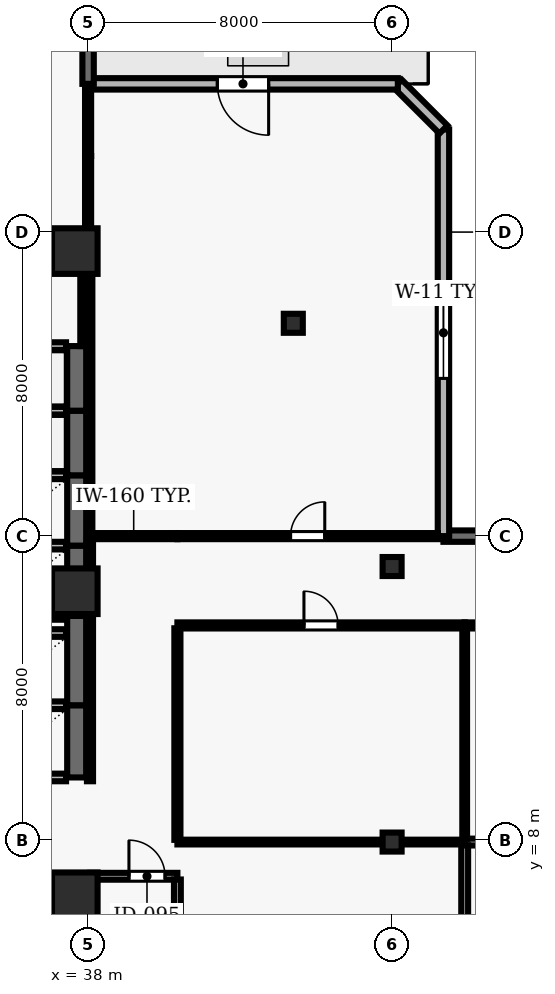
"""IFC4 building model, lengths in metres.
Left out: names, types, materials, properties, quantities, classifications, styles, units other than length and angle.
Written with IfcOpenShell. Run it as: python <this file> out.ifc"""

import sys

from ifc_helpers import new_model, si_unit, direction, frame, frame_2d, origin, origin_2d, place, context, subcontext, project, spatial, rectangle, hollow_rectangle, extrude, element, fill, save


model = new_model("IFC4")
c1 = context("Model", 3, precision=1e-05, world=origin(), true_north=direction((0.0, 1.0)))
c2 = subcontext(c1, "Body", "Model", "MODEL_VIEW")
j1 = project(units=[si_unit("LENGTHUNIT", "METRE"), si_unit("PLANEANGLEUNIT", "RADIAN")], contexts=[c1])
p1 = place(None, origin())
s1 = spatial("IfcSite", under=j1, at=p1, CompositionType="ELEMENT")
p2 = place(p1, origin())
s2 = spatial("IfcBuilding", under=s1, at=p2, CompositionType="ELEMENT")
p3 = place(p2, frame((0.0, 0.0, 122.9)))
s3 = spatial("IfcBuildingStorey", under=s2, at=p3, CompositionType="ELEMENT", Elevation=122.9)
for number, where, z_axis, x_axis in (
    (1, (37.65, 6.55, 0.0), (0.0, 0.0, 1.0), (1.0, 0.0, 0.0)),
    (2, (37.65, 14.55, 0.0), (0.0, 0.0, 1.0), (1.0, 0.0, 0.0)),
    (3, (37.65, 23.5, 0.0), (0.0, 0.0, 1.0), (1.0, 0.0, 0.0)),
):
    element("IfcColumn", number, at=place(p3, frame(where, z_axis=z_axis, x_axis=x_axis)), inside=s3, PredefinedType="COLUMN", context=c2, shape_type="SweptSolid", body=[
        extrude(rectangle(XDim=1.2, YDim=1.2, at=origin_2d()), origin(), (0.0, 0.0, 1.0), 3.9),
    ])
for number, where, z_axis, x_axis in (
    (4, (46.0, 7.95, 0.0), (0.0, 0.0, 1.0), (1.0, 0.0, 0.0)),
    (5, (46.0, 15.2, 0.0), (0.0, 0.0, 1.0), (1.0, 0.0, 0.0)),
    (6, (43.4, 21.6, 0.0), (0.0, 0.0, 1.0), (1.0, 0.0, 0.0)),
):
    element("IfcColumn", number, at=place(p3, frame(where, z_axis=z_axis, x_axis=x_axis)), inside=s3, PredefinedType="COLUMN", context=c2, shape_type="SweptSolid", body=[
        extrude(hollow_rectangle(XDim=0.5, YDim=0.5, WallThickness=0.025, at=origin_2d()), origin(), (0.0, 0.0, 1.0), 3.9),
    ])
p4 = place(p3, frame((68.1, 16.0, 0.0), z_axis=(0.0, 0.0, 1.0), x_axis=(-1.0, 0.0, 0.0)))
e7 = element("IfcWall", 7, at=p4, inside=s3, PredefinedType="SOLIDWALL", context=c2, shape_type="SweptSolid", body=[
    extrude(rectangle(XDim=20.749, YDim=0.3, at=frame_2d((10.375, 0.0))), origin(), (0.0, 0.0, 1.0), 3.69),
])
p5 = place(p4, frame((7.248, 0.0, 0.0)))
e8 = element("IfcOpeningElement", 8, at=p5, cuts=e7, PredefinedType="OPENING", context=c2, shape_type="SweptSolid", body=[
    extrude(rectangle(XDim=1.0, YDim=2.2, at=frame_2d((0.5, 1.1))), frame((0.0, 0.16, 0.0), z_axis=(0.0, -1.0, 0.0), x_axis=(1.0, 0.0, 0.0)), (0.0, 0.0, 1.0), 0.32),
])
p6 = place(p4, frame((2.558, 0.0, 0.9)))
e9 = element("IfcOpeningElement", 9, at=p6, cuts=e7, PredefinedType="OPENING", context=c2, shape_type="SweptSolid", body=[
    extrude(rectangle(XDim=1.8, YDim=2.2, at=frame_2d((0.9, 1.1))), frame((0.0, 0.16, 0.0), z_axis=(0.0, -1.0, 0.0), x_axis=(1.0, 0.0, 0.0)), (0.0, 0.0, 1.0), 0.32),
])
p7 = place(p4, frame((9.474, 0.0, 0.9)))
e10 = element("IfcOpeningElement", 10, at=p7, cuts=e7, PredefinedType="OPENING", context=c2, shape_type="SweptSolid", body=[
    extrude(rectangle(XDim=1.8, YDim=2.2, at=frame_2d((0.9, 1.1))), frame((0.0, 0.16, 0.0), z_axis=(0.0, -1.0, 0.0), x_axis=(1.0, 0.0, 0.0)), (0.0, 0.0, 1.0), 0.32),
])
p8 = place(p4, frame((16.391, 0.0, 0.9)))
e11 = element("IfcOpeningElement", 11, at=p8, cuts=e7, PredefinedType="OPENING", context=c2, shape_type="SweptSolid", body=[
    extrude(rectangle(XDim=1.8, YDim=2.2, at=frame_2d((0.9, 1.1))), frame((0.0, 0.16, 0.0), z_axis=(0.0, -1.0, 0.0), x_axis=(1.0, 0.0, 0.0)), (0.0, 0.0, 1.0), 0.32),
])
p9 = place(p3, frame((47.351, 16.0, 0.0), z_axis=(0.0, 0.0, 1.0), x_axis=(0.0, 1.0, 0.0)))
e12 = element("IfcWall", 12, at=p9, inside=s3, PredefinedType="SOLIDWALL", context=c2, shape_type="SweptSolid", body=[
    extrude(rectangle(XDim=10.7, YDim=0.3, at=frame_2d((5.35, 0.0))), origin(), (0.0, 0.0, 1.0), 3.69),
])
p10 = place(p9, frame((4.15, 0.0, 0.9)))
e13 = element("IfcOpeningElement", 13, at=p10, cuts=e12, PredefinedType="OPENING", context=c2, shape_type="SweptSolid", body=[
    extrude(rectangle(XDim=2.4, YDim=2.2, at=frame_2d((1.2, 1.1))), frame((0.0, 0.16, 0.0), z_axis=(0.0, -1.0, 0.0), x_axis=(1.0, 0.0, 0.0)), (0.0, 0.0, 1.0), 0.32),
])
p11 = place(p3, frame((47.351, 26.7, 0.0), z_axis=(0.0, 0.0, 1.0), x_axis=(-0.707178703759, 0.707034851297, 0.0)))
e14 = element("IfcWall", 14, at=p11, inside=s3, PredefinedType="SOLIDWALL", context=c2, shape_type="SweptSolid", body=[
    extrude(rectangle(XDim=1.697, YDim=0.3, at=frame_2d((0.849, 0.0))), origin(), (0.0, 0.0, 1.0), 3.69),
])
p12 = place(p3, frame((46.151, 27.9, 0.0), z_axis=(0.0, 0.0, 1.0), x_axis=(-1.0, 0.0, 0.0)))
e15 = element("IfcWall", 15, at=p12, inside=s3, PredefinedType="SOLIDWALL", context=c2, shape_type="SweptSolid", body=[
    extrude(rectangle(XDim=8.151, YDim=0.3, at=frame_2d((4.075, 0.0))), origin(), (0.0, 0.0, 1.0), 3.69),
])
p13 = place(p12, frame((3.4, 0.0, 0.0)))
e16 = element("IfcOpeningElement", 16, at=p13, cuts=e15, PredefinedType="OPENING", context=c2, shape_type="SweptSolid", body=[
    extrude(rectangle(XDim=1.35, YDim=2.2, at=frame_2d((0.675, 1.1))), frame((0.0, 0.16, 0.0), z_axis=(0.0, -1.0, 0.0), x_axis=(1.0, 0.0, 0.0)), (0.0, 0.0, 1.0), 0.32),
])
p14 = place(p3, frame((38.0, 27.9, 0.0), z_axis=(0.0, 0.0, 1.0), x_axis=(0.0, 1.0, 0.0)))
e17 = element("IfcWall", 17, at=p14, inside=s3, PredefinedType="SOLIDWALL", context=c2, shape_type="SweptSolid", body=[
    extrude(rectangle(XDim=18.2, YDim=0.3, at=frame_2d((9.1, 0.0))), origin(), (0.0, 0.0, 1.0), 3.69),
])
p15 = place(p14, frame((9.425, 0.0, 0.0)))
e18 = element("IfcOpeningElement", 18, at=p15, cuts=e17, PredefinedType="OPENING", context=c2, shape_type="SweptSolid", body=[
    extrude(rectangle(XDim=1.0, YDim=2.2, at=frame_2d((0.5, 1.1))), frame((0.0, 0.16, 0.0), z_axis=(0.0, -1.0, 0.0), x_axis=(1.0, 0.0, 0.0)), (0.0, 0.0, 1.0), 0.32),
])
p16 = place(p14, frame((2.733, 0.0, 0.9)))
e19 = element("IfcOpeningElement", 19, at=p16, cuts=e17, PredefinedType="OPENING", context=c2, shape_type="SweptSolid", body=[
    extrude(rectangle(XDim=1.5, YDim=1.6, at=frame_2d((0.75, 0.8))), frame((0.0, 0.16, 0.0), z_axis=(0.0, -1.0, 0.0), x_axis=(1.0, 0.0, 0.0)), (0.0, 0.0, 1.0), 0.32),
])
p17 = place(p14, frame((14.417, 0.0, 0.9)))
e20 = element("IfcOpeningElement", 20, at=p17, cuts=e17, PredefinedType="OPENING", context=c2, shape_type="SweptSolid", body=[
    extrude(rectangle(XDim=1.5, YDim=1.6, at=frame_2d((0.75, 0.8))), frame((0.0, 0.16, 0.0), z_axis=(0.0, -1.0, 0.0), x_axis=(1.0, 0.0, 0.0)), (0.0, 0.0, 1.0), 0.32),
])
p18 = place(p3, frame((37.7, 4.7, 0.0), z_axis=(0.0, 0.0, 1.0), x_axis=(0.0, 1.0, 0.0)))
e21 = element("IfcWall", 21, at=p18, inside=s3, PredefinedType="SHEAR", context=c2, shape_type="SweptSolid", body=[
    extrude(rectangle(XDim=2.25, YDim=0.5, at=frame_2d((1.125, 0.0))), origin(), (0.0, 0.0, 1.0), 3.69),
])
p19 = place(p3, frame((37.42, 6.95, 0.0), z_axis=(0.0, 0.0, 1.0), x_axis=(-1.0, 0.0, 0.0)))
e22 = element("IfcWall", 22, at=p19, inside=s3, PredefinedType="SOLIDWALL", context=c2, shape_type="SweptSolid", body=[
    extrude(rectangle(XDim=2.14, YDim=0.2, at=frame_2d((1.07, 0.0))), origin(), (0.0, 0.0, 1.0), 3.69),
])
p20 = place(p3, frame((37.7, 9.65, 0.0), z_axis=(0.0, 0.0, 1.0), x_axis=(0.0, 1.0, 0.0)))
e23 = element("IfcWall", 23, at=p20, inside=s3, PredefinedType="SHEAR", context=c2, shape_type="SweptSolid", body=[
    extrude(rectangle(XDim=1.9, YDim=0.5, at=frame_2d((0.95, 0.0))), origin(), (0.0, 0.0, 1.0), 3.69),
])
for number, where, z_axis, x_axis in (
    (24, (35.28, 9.65, 0.0), (0.0, 0.0, 1.0), (1.0, 0.0, 0.0)),
    (25, (37.42, 11.55, 0.0), (0.0, 0.0, 1.0), (-1.0, 0.0, 0.0)),
):
    element("IfcWall", number, at=place(p3, frame(where, z_axis=z_axis, x_axis=x_axis)), inside=s3, PredefinedType="SOLIDWALL", context=c2, shape_type="SweptSolid", body=[
        extrude(rectangle(XDim=2.14, YDim=0.2, at=frame_2d((1.07, 0.0))), origin(), (0.0, 0.0, 1.0), 3.69),
    ])
p21 = place(p3, frame((37.7, 11.55, 0.0), z_axis=(0.0, 0.0, 1.0), x_axis=(0.0, 1.0, 0.0)))
e26 = element("IfcWall", 26, at=p21, inside=s3, PredefinedType="SHEAR", context=c2, shape_type="SweptSolid", body=[
    extrude(rectangle(XDim=2.35, YDim=0.5, at=frame_2d((1.175, 0.0))), origin(), (0.0, 0.0, 1.0), 3.69),
])
p22 = place(p3, frame((37.42, 13.45, 0.0), z_axis=(0.0, 0.0, 1.0), x_axis=(-1.0, 0.0, 0.0)))
e27 = element("IfcWall", 27, at=p22, inside=s3, PredefinedType="SOLIDWALL", context=c2, shape_type="SweptSolid", body=[
    extrude(rectangle(XDim=2.14, YDim=0.2, at=frame_2d((1.07, 0.0))), origin(), (0.0, 0.0, 1.0), 3.69),
])
p23 = place(p3, frame((37.7, 13.9, 0.0), z_axis=(0.0, 0.0, 1.0), x_axis=(0.0, 1.0, 0.0)))
e28 = element("IfcWall", 28, at=p23, inside=s3, PredefinedType="SHEAR", context=c2, shape_type="SweptSolid", body=[
    extrude(rectangle(XDim=1.85, YDim=0.5, at=frame_2d((0.925, 0.0))), origin(), (0.0, 0.0, 1.0), 3.69),
])
for number, where, z_axis, x_axis in (
    (29, (35.28, 13.9, 0.0), (0.0, 0.0, 1.0), (1.0, 0.0, 0.0)),
    (30, (37.42, 15.75, 0.0), (0.0, 0.0, 1.0), (-1.0, 0.0, 0.0)),
):
    element("IfcWall", number, at=place(p3, frame(where, z_axis=z_axis, x_axis=x_axis)), inside=s3, PredefinedType="SOLIDWALL", context=c2, shape_type="SweptSolid", body=[
        extrude(rectangle(XDim=2.14, YDim=0.2, at=frame_2d((1.07, 0.0))), origin(), (0.0, 0.0, 1.0), 3.69),
    ])
p24 = place(p3, frame((37.7, 15.75, 0.0), z_axis=(0.0, 0.0, 1.0), x_axis=(0.0, 1.0, 0.0)))
e31 = element("IfcWall", 31, at=p24, inside=s3, PredefinedType="SHEAR", context=c2, shape_type="SweptSolid", body=[
    extrude(rectangle(XDim=1.85, YDim=0.5, at=frame_2d((0.925, 0.0))), origin(), (0.0, 0.0, 1.0), 3.69),
])
p25 = place(p3, frame((37.42, 17.6, 0.0), z_axis=(0.0, 0.0, 1.0), x_axis=(-1.0, 0.0, 0.0)))
e32 = element("IfcWall", 32, at=p25, inside=s3, PredefinedType="SOLIDWALL", context=c2, shape_type="SweptSolid", body=[
    extrude(rectangle(XDim=2.14, YDim=0.2, at=frame_2d((1.07, 0.0))), origin(), (0.0, 0.0, 1.0), 3.69),
])
p26 = place(p3, frame((37.7, 17.6, 0.0), z_axis=(0.0, 0.0, 1.0), x_axis=(0.0, 1.0, 0.0)))
e33 = element("IfcWall", 33, at=p26, inside=s3, PredefinedType="SHEAR", context=c2, shape_type="SweptSolid", body=[
    extrude(rectangle(XDim=1.7, YDim=0.5, at=frame_2d((0.85, 0.0))), origin(), (0.0, 0.0, 1.0), 3.69),
])
p27 = place(p3, frame((37.42, 19.3, 0.0), z_axis=(0.0, 0.0, 1.0), x_axis=(-1.0, 0.0, 0.0)))
e34 = element("IfcWall", 34, at=p27, inside=s3, PredefinedType="SOLIDWALL", context=c2, shape_type="SweptSolid", body=[
    extrude(rectangle(XDim=2.14, YDim=0.2, at=frame_2d((1.07, 0.0))), origin(), (0.0, 0.0, 1.0), 3.69),
])
p28 = place(p3, frame((37.7, 19.3, 0.0), z_axis=(0.0, 0.0, 1.0), x_axis=(0.0, 1.0, 0.0)))
e35 = element("IfcWall", 35, at=p28, inside=s3, PredefinedType="SHEAR", context=c2, shape_type="SweptSolid", body=[
    extrude(rectangle(XDim=1.7, YDim=0.5, at=frame_2d((0.85, 0.0))), origin(), (0.0, 0.0, 1.0), 3.69),
])
p29 = place(p3, frame((37.42, 21.0, 0.0), z_axis=(0.0, 0.0, 1.0), x_axis=(-1.0, 0.0, 0.0)))
e36 = element("IfcWall", 36, at=p29, inside=s3, PredefinedType="SOLIDWALL", context=c2, shape_type="SweptSolid", body=[
    extrude(rectangle(XDim=2.14, YDim=0.2, at=frame_2d((1.07, 0.0))), origin(), (0.0, 0.0, 1.0), 3.69),
])
p30 = place(p3, frame((37.85, 23.85, 0.0), z_axis=(0.0, 0.0, 1.0), x_axis=(-1.0, 0.0, 0.0)))
e37 = element("IfcWall", 37, at=p30, inside=s3, PredefinedType="PARTITIONING", context=c2, shape_type="SweptSolid", body=[
    extrude(rectangle(XDim=4.0, YDim=0.16, at=frame_2d((2.0, 0.0))), origin(), (0.0, 0.0, 1.0), 3.073),
])
p31 = place(p30, frame((2.25, 0.0, 0.0)))
e38 = element("IfcOpeningElement", 38, at=p31, cuts=e37, PredefinedType="OPENING", context=c2, shape_type="SweptSolid", body=[
    extrude(rectangle(XDim=0.9, YDim=2.1, at=frame_2d((0.45, 1.05))), frame((0.0, 0.09, 0.0), z_axis=(0.0, -1.0, 0.0), x_axis=(1.0, 0.0, 0.0)), (0.0, 0.0, 1.0), 0.18),
])
p32 = place(p3, frame((38.05, 7.05, 0.0), z_axis=(0.0, 0.0, 1.0), x_axis=(1.0, 0.0, 0.0)))
e39 = element("IfcWall", 39, at=p32, inside=s3, PredefinedType="PARTITIONING", context=c2, shape_type="SweptSolid", body=[
    extrude(rectangle(XDim=2.3, YDim=0.18, at=frame_2d((1.15, 0.0))), origin(), (0.0, 0.0, 1.0), 3.69),
])
p33 = place(p32, frame((1.025, 0.0, 0.0)))
e40 = element("IfcOpeningElement", 40, at=p33, cuts=e39, PredefinedType="OPENING", context=c2, shape_type="SweptSolid", body=[
    extrude(rectangle(XDim=0.95, YDim=2.1, at=frame_2d((0.475, 1.05))), frame((0.0, 0.1, 0.0), z_axis=(0.0, -1.0, 0.0), x_axis=(1.0, 0.0, 0.0)), (0.0, 0.0, 1.0), 0.2),
])
p34 = place(p3, frame((40.35, 13.65, 0.0), z_axis=(0.0, 0.0, 1.0), x_axis=(1.0, 0.0, 0.0)))
e41 = element("IfcWall", 41, at=p34, inside=s3, PredefinedType="PARTITIONING", context=c2, shape_type="SweptSolid", body=[
    extrude(rectangle(XDim=7.56, YDim=0.16, at=frame_2d((3.78, 0.0))), origin(), (0.0, 0.0, 1.0), 3.69),
])
p35 = place(p34, frame((3.33, 0.0, 0.0)))
e42 = element("IfcOpeningElement", 42, at=p35, cuts=e41, PredefinedType="OPENING", context=c2, shape_type="SweptSolid", body=[
    extrude(rectangle(XDim=0.9, YDim=2.1, at=frame_2d((0.45, 1.05))), frame((0.0, 0.09, 0.0), z_axis=(0.0, -1.0, 0.0), x_axis=(1.0, 0.0, 0.0)), (0.0, 0.0, 1.0), 0.18),
])
p36 = place(p3, frame((40.35, 16.0, 0.0), z_axis=(0.0, 0.0, 1.0), x_axis=(-1.0, 0.0, 0.0)))
e43 = element("IfcWall", 43, at=p36, inside=s3, PredefinedType="PARTITIONING", context=c2, shape_type="SweptSolid", body=[
    extrude(rectangle(XDim=2.3, YDim=0.16, at=frame_2d((1.15, 0.0))), origin(), (0.0, 0.0, 1.0), 3.69),
])
p37 = place(p3, frame((40.35, 16.0, 0.0), z_axis=(0.0, 0.0, 1.0), x_axis=(1.0, 0.0, 0.0)))
e44 = element("IfcWall", 44, at=p37, inside=s3, PredefinedType="PARTITIONING", context=c2, shape_type="SweptSolid", body=[
    extrude(rectangle(XDim=6.856, YDim=0.16, at=frame_2d((3.428, 0.0))), origin(), (0.0, 0.0, 1.0), 3.39),
])
p38 = place(p37, frame((2.978, 0.0, 0.0)))
e45 = element("IfcOpeningElement", 45, at=p38, cuts=e44, PredefinedType="OPENING", context=c2, shape_type="SweptSolid", body=[
    extrude(rectangle(XDim=0.9, YDim=2.1, at=frame_2d((0.45, 1.05))), frame((0.0, 0.09, 0.0), z_axis=(0.0, -1.0, 0.0), x_axis=(1.0, 0.0, 0.0)), (0.0, 0.0, 1.0), 0.18),
])
p39 = place(p3, frame((47.91, 7.95, 0.0), z_axis=(0.0, 0.0, 1.0), x_axis=(-1.0, 0.0, 0.0)))
e46 = element("IfcWall", 46, at=p39, inside=s3, PredefinedType="PARTITIONING", context=c2, shape_type="SweptSolid", body=[
    extrude(rectangle(XDim=7.56, YDim=0.125, at=frame_2d((3.78, 0.0))), origin(), (0.0, 0.0, 1.0), 3.073),
])
p40 = place(p3, frame((47.91, 13.65, 0.0), z_axis=(0.0, 0.0, 1.0), x_axis=(1.0, 0.0, 0.0)))
e47 = element("IfcWall", 47, at=p40, inside=s3, PredefinedType="PARTITIONING", context=c2, shape_type="SweptSolid", body=[
    extrude(rectangle(XDim=8.17, YDim=0.16, at=frame_2d((4.085, 0.0))), origin(), (0.0, 0.0, 1.0), 3.69),
])
p41 = place(p40, frame((5.035, 0.0, 0.0)))
e48 = element("IfcOpeningElement", 48, at=p41, cuts=e47, PredefinedType="OPENING", context=c2, shape_type="SweptSolid", body=[
    extrude(rectangle(XDim=0.9, YDim=2.1, at=frame_2d((0.45, 1.05))), frame((0.0, 0.09, 0.0), z_axis=(0.0, -1.0, 0.0), x_axis=(1.0, 0.0, 0.0)), (0.0, 0.0, 1.0), 0.18),
])
p42 = place(p3, frame((56.08, 7.95, 0.0), z_axis=(0.0, 0.0, 1.0), x_axis=(-1.0, 0.0, 0.0)))
e49 = element("IfcWall", 49, at=p42, inside=s3, PredefinedType="PARTITIONING", context=c2, shape_type="SweptSolid", body=[
    extrude(rectangle(XDim=8.17, YDim=0.18, at=frame_2d((4.085, 0.0))), origin(), (0.0, 0.0, 1.0), 3.073),
])
p43 = place(p3, frame((37.85, 21.0, 0.0), z_axis=(0.0, 0.0, 1.0), x_axis=(0.0, 1.0, 0.0)))
e50 = element("IfcWall", 50, at=p43, inside=s3, PredefinedType="MOVABLE", context=c2, shape_type="SweptSolid", body=[
    extrude(rectangle(XDim=2.775, YDim=0.11, at=frame_2d((1.387, 0.0))), origin(), (0.0, 0.0, 1.0), 3.073),
])
p44 = place(p3, frame((38.0, 23.85, 0.0), z_axis=(0.0, 0.0, 1.0), x_axis=(0.0, 1.0, 0.0)))
e51 = element("IfcWall", 51, at=p44, inside=s3, PredefinedType="PARTITIONING", context=c2, shape_type="SweptSolid", body=[
    extrude(rectangle(XDim=2.15, YDim=0.16, at=frame_2d((1.075, 0.0))), origin(), (0.0, 0.0, 1.0), 3.073),
])
p45 = place(p3, frame((38.0, 26.0, 0.0), z_axis=(0.0, 0.0, 1.0), x_axis=(0.0, 1.0, 0.0)))
e52 = element("IfcWall", 52, at=p45, inside=s3, PredefinedType="PARTITIONING", context=c2, shape_type="SweptSolid", body=[
    extrude(rectangle(XDim=1.755, YDim=0.16, at=frame_2d((0.877, 0.0))), origin(), (0.0, 0.0, 1.0), 3.073),
])
p46 = place(p3, frame((38.05, 6.965, 0.0), z_axis=(0.0, 0.0, 1.0), x_axis=(0.0, -1.0, 0.0)))
e53 = element("IfcWall", 53, at=p46, inside=s3, PredefinedType="PARTITIONING", context=c2, shape_type="SweptSolid", body=[
    extrude(rectangle(XDim=6.82, YDim=0.18, at=frame_2d((3.41, 0.0))), origin(), (0.0, 0.0, 1.0), 3.073),
])
p47 = place(p3, frame((38.05, 15.925, 0.0), z_axis=(0.0, 0.0, 1.0), x_axis=(0.0, -1.0, 0.0)))
e54 = element("IfcWall", 54, at=p47, inside=s3, PredefinedType="PARTITIONING", context=c2, shape_type="SweptSolid", body=[
    extrude(rectangle(XDim=6.375, YDim=0.16, at=frame_2d((3.188, 0.0))), origin(), (0.0, 0.0, 1.0), 3.073),
])
p48 = place(p3, frame((38.05, 23.85, 0.0), z_axis=(0.0, 0.0, 1.0), x_axis=(0.0, -1.0, 0.0)))
e55 = element("IfcWall", 55, at=p48, inside=s3, PredefinedType="PARTITIONING", context=c2, shape_type="SweptSolid", body=[
    extrude(rectangle(XDim=7.775, YDim=0.125, at=frame_2d((3.888, 0.0))), origin(), (0.0, 0.0, 1.0), 3.073),
])
p49 = place(p3, frame((40.35, 0.145, 0.0), z_axis=(0.0, 0.0, 1.0), x_axis=(0.0, 1.0, 0.0)))
e56 = element("IfcWall", 56, at=p49, inside=s3, PredefinedType="PARTITIONING", context=c2, shape_type="SweptSolid", body=[
    extrude(rectangle(XDim=6.82, YDim=0.18, at=frame_2d((3.41, 0.0))), origin(), (0.0, 0.0, 1.0), 3.69),
])
p50 = place(p49, frame((2.96, 0.0, 0.0)))
e57 = element("IfcOpeningElement", 57, at=p50, cuts=e56, PredefinedType="OPENING", context=c2, shape_type="SweptSolid", body=[
    extrude(rectangle(XDim=0.9, YDim=2.1, at=frame_2d((0.45, 1.05))), frame((0.0, 0.1, 0.0), z_axis=(0.0, -1.0, 0.0), x_axis=(1.0, 0.0, 0.0)), (0.0, 0.0, 1.0), 0.2),
])
p51 = place(p3, frame((40.35, 8.008, 0.0), z_axis=(0.0, 0.0, 1.0), x_axis=(0.0, 1.0, 0.0)))
e58 = element("IfcWall", 58, at=p51, inside=s3, PredefinedType="PARTITIONING", context=c2, shape_type="SweptSolid", body=[
    extrude(rectangle(XDim=5.567, YDim=0.16, at=frame_2d((2.783, 0.0))), origin(), (0.0, 0.0, 1.0), 3.69),
])
p52 = place(p3, frame((47.91, 0.145, 0.0), z_axis=(0.0, 0.0, 1.0), x_axis=(0.0, 1.0, 0.0)))
e59 = element("IfcWall", 59, at=p52, inside=s3, PredefinedType="PARTITIONING", context=c2, shape_type="SweptSolid", body=[
    extrude(rectangle(XDim=7.72, YDim=0.18, at=frame_2d((3.86, 0.0))), origin(), (0.0, 0.0, 1.0), 3.69),
])
p53 = place(p52, frame((3.385, 0.0, 0.0)))
e60 = element("IfcOpeningElement", 60, at=p53, cuts=e59, PredefinedType="OPENING", context=c2, shape_type="SweptSolid", body=[
    extrude(rectangle(XDim=0.95, YDim=2.1, at=frame_2d((0.475, 1.05))), frame((0.0, 0.1, 0.0), z_axis=(0.0, -1.0, 0.0), x_axis=(1.0, 0.0, 0.0)), (0.0, 0.0, 1.0), 0.2),
])
p54 = place(p3, frame((47.91, 8.035, 0.0), z_axis=(0.0, 0.0, 1.0), x_axis=(0.0, 1.0, 0.0)))
e61 = element("IfcWall", 61, at=p54, inside=s3, PredefinedType="PARTITIONING", context=c2, shape_type="SweptSolid", body=[
    extrude(rectangle(XDim=5.54, YDim=0.125, at=frame_2d((2.77, 0.0))), origin(), (0.0, 0.0, 1.0), 3.69),
])
p55 = place(p10, origin())
e62 = element("IfcWindow", 62, at=p55, inside=s3, PartitioningType="SINGLE_PANEL", PredefinedType="WINDOW", context=c2, shape_type="SweptSolid", body=[
    extrude(rectangle(XDim=2.4, YDim=2.2, at=frame_2d((1.2, 1.1))), frame((0.0, 0.03, 0.0), z_axis=(0.0, -1.0, 0.0), x_axis=(1.0, 0.0, 0.0)), (0.0, 0.0, 1.0), 0.06),
])
fill(e13, e62)
p56 = place(p13, origin())
e63 = element("IfcDoor", 63, at=p56, inside=s3, OperationType="SINGLE_SWING_LEFT", PredefinedType="DOOR", context=c2, shape_type="SweptSolid", body=[
    extrude(rectangle(XDim=1.35, YDim=2.2, at=frame_2d((0.675, 1.1))), frame((0.0, 0.025, 0.0), z_axis=(0.0, -1.0, 0.0), x_axis=(1.0, 0.0, 0.0)), (0.0, 0.0, 1.0), 0.05),
])
fill(e16, e63)
p57 = place(p33, origin())
e64 = element("IfcDoor", 64, at=p57, inside=s3, OperationType="SINGLE_SWING_LEFT", PredefinedType="DOOR", context=c2, shape_type="SweptSolid", body=[
    extrude(rectangle(XDim=0.95, YDim=2.1, at=frame_2d((0.475, 1.05))), frame((0.0, 0.025, 0.0), z_axis=(0.0, -1.0, 0.0), x_axis=(1.0, 0.0, 0.0)), (0.0, 0.0, 1.0), 0.05),
])
fill(e40, e64)
p58 = place(p35, origin())
e65 = element("IfcDoor", 65, at=p58, inside=s3, OperationType="SINGLE_SWING_LEFT", PredefinedType="DOOR", context=c2, shape_type="SweptSolid", body=[
    extrude(rectangle(XDim=0.9, YDim=2.1, at=frame_2d((0.45, 1.05))), frame((0.0, 0.025, 0.0), z_axis=(0.0, -1.0, 0.0), x_axis=(1.0, 0.0, 0.0)), (0.0, 0.0, 1.0), 0.05),
])
fill(e42, e65)
p59 = place(p38, origin())
e66 = element("IfcDoor", 66, at=p59, inside=s3, OperationType="SINGLE_SWING_RIGHT", PredefinedType="DOOR", context=c2, shape_type="SweptSolid", body=[
    extrude(rectangle(XDim=0.9, YDim=2.1, at=frame_2d((0.45, 1.05))), frame((0.0, 0.025, 0.0), z_axis=(0.0, -1.0, 0.0), x_axis=(1.0, 0.0, 0.0)), (0.0, 0.0, 1.0), 0.05),
])
fill(e45, e66)
save(model, sys.argv[1])
